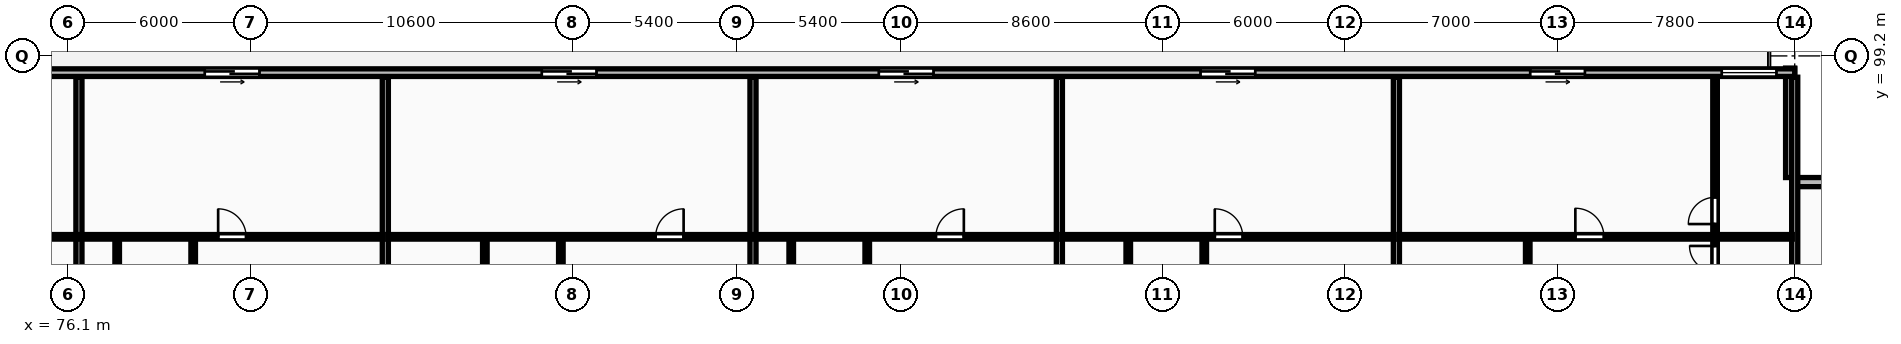
"""IFC4 building model, lengths in metres.
Left out: names, types, materials, properties, quantities, classifications, styles, units other than length and angle.
Written with IfcOpenShell. Run it as: python <this file> out.ifc"""

import sys

from ifc_helpers import new_model, si_unit, direction, frame, frame_2d, origin, place, context, subcontext, project, spatial, rectangle, extrude, element, fill, save


model = new_model("IFC4")
c1 = context("Model", 3, precision=1e-05, world=origin(), true_north=direction((0.0, 1.0)))
c2 = subcontext(c1, "Body", "Model", "MODEL_VIEW")
j1 = project(units=[si_unit("LENGTHUNIT", "METRE"), si_unit("PLANEANGLEUNIT", "RADIAN")], contexts=[c1])
p1 = place(None, origin())
s1 = spatial("IfcSite", under=j1, at=p1, CompositionType="ELEMENT")
p2 = place(p1, origin())
s2 = spatial("IfcBuilding", under=s1, at=p2, CompositionType="ELEMENT")
p3 = place(p2, frame((0.0, 0.0, 24.0)))
s3 = spatial("IfcBuildingStorey", under=s2, at=p3, CompositionType="ELEMENT", Elevation=24.0)
for number, where, z_axis, x_axis in (
    (1, (136.5, 95.05, 0.0), (0.0, 0.0, 1.0), (-1.0, 0.0, 0.0)),
    (2, (132.75, 95.2, 0.0), (0.0, 0.0, 1.0), (0.0, 1.0, 0.0)),
):
    element("IfcWall", number, at=place(p3, frame(where, z_axis=z_axis, x_axis=x_axis)), inside=s3, PredefinedType="STANDARD", context=c2, shape_type="SweptSolid", body=[
        extrude(rectangle(XDim=3.6, YDim=0.3, at=frame_2d((1.8, 0.0))), origin(), (0.0, 0.0, 1.0), 2.97),
    ])
p4 = place(p3, frame((132.9, 98.65, 0.0), z_axis=(0.0, 0.0, 1.0), x_axis=(-1.0, 0.0, 0.0)))
e3 = element("IfcWall", 3, at=p4, inside=s3, PredefinedType="STANDARD", context=c2, shape_type="SweptSolid", body=[
    extrude(rectangle(XDim=77.6, YDim=0.25, at=frame_2d((38.8, 0.0))), origin(), (0.0, 0.0, 1.0), 2.97),
])
p5 = place(p4, frame((71.661, 0.0, 0.0)))
e4 = element("IfcOpeningElement", 4, at=p5, cuts=e3, PredefinedType="OPENING", context=c2, shape_type="SweptSolid", body=[
    extrude(rectangle(XDim=1.8, YDim=2.2, at=frame_2d((0.9, 1.1))), frame((0.0, 0.135, 0.0), z_axis=(0.0, -1.0, 0.0), x_axis=(1.0, 0.0, 0.0)), (0.0, 0.0, 1.0), 0.27),
])
p6 = place(p4, frame((61.079, 0.0, 0.0)))
e5 = element("IfcOpeningElement", 5, at=p6, cuts=e3, PredefinedType="OPENING", context=c2, shape_type="SweptSolid", body=[
    extrude(rectangle(XDim=1.8, YDim=2.2, at=frame_2d((0.9, 1.1))), frame((0.0, 0.135, 0.0), z_axis=(0.0, -1.0, 0.0), x_axis=(1.0, 0.0, 0.0)), (0.0, 0.0, 1.0), 0.27),
])
p7 = place(p4, frame((50.498, 0.0, 0.0)))
e6 = element("IfcOpeningElement", 6, at=p7, cuts=e3, PredefinedType="OPENING", context=c2, shape_type="SweptSolid", body=[
    extrude(rectangle(XDim=1.8, YDim=2.2, at=frame_2d((0.9, 1.1))), frame((0.0, 0.135, 0.0), z_axis=(0.0, -1.0, 0.0), x_axis=(1.0, 0.0, 0.0)), (0.0, 0.0, 1.0), 0.27),
])
p8 = place(p4, frame((39.412, 0.0, 0.0)))
e7 = element("IfcOpeningElement", 7, at=p8, cuts=e3, PredefinedType="OPENING", context=c2, shape_type="SweptSolid", body=[
    extrude(rectangle(XDim=1.8, YDim=2.2, at=frame_2d((0.9, 1.1))), frame((0.0, 0.135, 0.0), z_axis=(0.0, -1.0, 0.0), x_axis=(1.0, 0.0, 0.0)), (0.0, 0.0, 1.0), 0.27),
])
p9 = place(p4, frame((28.326, 0.0, 0.0)))
e8 = element("IfcOpeningElement", 8, at=p9, cuts=e3, PredefinedType="OPENING", context=c2, shape_type="SweptSolid", body=[
    extrude(rectangle(XDim=1.8, YDim=2.2, at=frame_2d((0.9, 1.1))), frame((0.0, 0.135, 0.0), z_axis=(0.0, -1.0, 0.0), x_axis=(1.0, 0.0, 0.0)), (0.0, 0.0, 1.0), 0.27),
])
p10 = place(p4, frame((17.744, 0.0, 0.0)))
e9 = element("IfcOpeningElement", 9, at=p10, cuts=e3, PredefinedType="OPENING", context=c2, shape_type="SweptSolid", body=[
    extrude(rectangle(XDim=1.8, YDim=2.2, at=frame_2d((0.9, 1.1))), frame((0.0, 0.135, 0.0), z_axis=(0.0, -1.0, 0.0), x_axis=(1.0, 0.0, 0.0)), (0.0, 0.0, 1.0), 0.27),
])
p11 = place(p4, frame((6.901, 0.0, 0.0)))
e10 = element("IfcOpeningElement", 10, at=p11, cuts=e3, PredefinedType="OPENING", context=c2, shape_type="SweptSolid", body=[
    extrude(rectangle(XDim=1.8, YDim=2.2, at=frame_2d((0.9, 1.1))), frame((0.0, 0.135, 0.0), z_axis=(0.0, -1.0, 0.0), x_axis=(1.0, 0.0, 0.0)), (0.0, 0.0, 1.0), 0.27),
])
p12 = place(p4, frame((0.6, 0.0, 0.85)))
e11 = element("IfcOpeningElement", 11, at=p12, cuts=e3, PredefinedType="OPENING", context=c2, shape_type="SweptSolid", body=[
    extrude(rectangle(XDim=1.8, YDim=1.8, at=frame_2d((0.9, 0.9))), frame((0.0, 0.135, 0.0), z_axis=(0.0, -1.0, 0.0), x_axis=(1.0, 0.0, 0.0)), (0.0, 0.0, 1.0), 0.27),
])
p13 = place(p3, frame((132.9, 69.43, 0.0), z_axis=(0.0, 0.0, 1.0), x_axis=(0.0, 1.0, 0.0)))
e12 = element("IfcWall", 12, at=p13, inside=s3, PredefinedType="PARTITIONING", context=c2, shape_type="SweptSolid", body=[
    extrude(rectangle(XDim=29.07, YDim=0.2, at=frame_2d((14.535, 0.0))), origin(), (0.0, 0.0, 1.0), 2.97),
])
p14 = place(p3, frame((76.464, 69.43, 0.0), z_axis=(0.0, 0.0, 1.0), x_axis=(0.0, 1.0, 0.0)))
e13 = element("IfcWall", 13, at=p14, inside=s3, PredefinedType="PARTITIONING", context=c2, shape_type="SweptSolid", body=[
    extrude(rectangle(XDim=29.07, YDim=0.2, at=frame_2d((14.535, 0.0))), origin(), (0.0, 0.0, 1.0), 2.22),
])
p15 = place(p3, frame((65.458, 93.25, 0.0), z_axis=(0.0, 0.0, 1.0), x_axis=(1.0, 0.0, 0.0)))
e14 = element("IfcWall", 14, at=p15, inside=s3, PredefinedType="PARTITIONING", context=c2, shape_type="SweptSolid", body=[
    extrude(rectangle(XDim=10.926, YDim=0.15, at=frame_2d((5.463, 0.0))), origin(), (0.0, 0.0, 1.0), 2.97),
])
p16 = place(p15, frame((5.003, 0.0, 0.0)))
e15 = element("IfcOpeningElement", 15, at=p16, cuts=e14, PredefinedType="OPENING", context=c2, shape_type="SweptSolid", body=[
    extrude(rectangle(XDim=0.92, YDim=2.08, at=frame_2d((0.46, 1.04))), frame((0.0, 0.085, 0.0), z_axis=(0.0, -1.0, 0.0), x_axis=(1.0, 0.0, 0.0)), (0.0, 0.0, 1.0), 0.17),
])
p17 = place(p3, frame((86.542, 69.43, 0.0), z_axis=(0.0, 0.0, 1.0), x_axis=(0.0, 1.0, 0.0)))
e16 = element("IfcWall", 16, at=p17, inside=s3, PredefinedType="PARTITIONING", context=c2, shape_type="SweptSolid", body=[
    extrude(rectangle(XDim=29.07, YDim=0.2, at=frame_2d((14.535, 0.0))), origin(), (0.0, 0.0, 1.0), 2.97),
])
p18 = place(p3, frame((77.721, 88.19, 0.0), z_axis=(0.0, 0.0, 1.0), x_axis=(0.0, 1.0, 0.0)))
e17 = element("IfcWall", 17, at=p18, inside=s3, PredefinedType="PARTITIONING", context=c2, shape_type="SweptSolid", body=[
    extrude(rectangle(XDim=5.0, YDim=0.15, at=frame_2d((2.5, 0.0))), origin(), (0.0, 0.0, 1.0), 2.97),
])
p19 = place(p18, frame((0.419, 0.0, 0.0)))
e18 = element("IfcOpeningElement", 18, at=p19, cuts=e17, PredefinedType="OPENING", context=c2, shape_type="SweptSolid", body=[
    extrude(rectangle(XDim=0.84, YDim=2.04, at=frame_2d((0.42, 1.02))), frame((0.0, 0.085, 0.0), z_axis=(0.0, -1.0, 0.0), x_axis=(1.0, 0.0, 0.0)), (0.0, 0.0, 1.0), 0.17),
])
p20 = place(p3, frame((80.221, 88.19, 0.0), z_axis=(0.0, 0.0, 1.0), x_axis=(0.0, 1.0, 0.0)))
e19 = element("IfcWall", 19, at=p20, inside=s3, PredefinedType="PARTITIONING", context=c2, shape_type="SweptSolid", body=[
    extrude(rectangle(XDim=5.0, YDim=0.15, at=frame_2d((2.5, 0.0))), origin(), (0.0, 0.0, 1.0), 2.97),
])
p21 = place(p20, frame((2.08, 0.0, 0.0)))
e20 = element("IfcOpeningElement", 20, at=p21, cuts=e19, PredefinedType="OPENING", context=c2, shape_type="SweptSolid", body=[
    extrude(rectangle(XDim=0.84, YDim=2.04, at=frame_2d((0.42, 1.02))), frame((0.0, 0.085, 0.0), z_axis=(0.0, -1.0, 0.0), x_axis=(1.0, 0.0, 0.0)), (0.0, 0.0, 1.0), 0.17),
])
p22 = place(p3, frame((76.544, 93.25, 0.0), z_axis=(0.0, 0.0, 1.0), x_axis=(1.0, 0.0, 0.0)))
e21 = element("IfcWall", 21, at=p22, inside=s3, PredefinedType="PARTITIONING", context=c2, shape_type="SweptSolid", body=[
    extrude(rectangle(XDim=9.918, YDim=0.15, at=frame_2d((4.959, 0.0))), origin(), (0.0, 0.0, 1.0), 2.97),
])
p23 = place(p22, frame((4.499, 0.0, 0.0)))
e22 = element("IfcOpeningElement", 22, at=p23, cuts=e21, PredefinedType="OPENING", context=c2, shape_type="SweptSolid", body=[
    extrude(rectangle(XDim=0.92, YDim=2.08, at=frame_2d((0.46, 1.04))), frame((0.0, 0.085, 0.0), z_axis=(0.0, -1.0, 0.0), x_axis=(1.0, 0.0, 0.0)), (0.0, 0.0, 1.0), 0.17),
])
p24 = place(p3, frame((98.635, 69.43, 0.0), z_axis=(0.0, 0.0, 1.0), x_axis=(0.0, 1.0, 0.0)))
e23 = element("IfcWall", 23, at=p24, inside=s3, PredefinedType="PARTITIONING", context=c2, shape_type="SweptSolid", body=[
    extrude(rectangle(XDim=29.07, YDim=0.2, at=frame_2d((14.535, 0.0))), origin(), (0.0, 0.0, 1.0), 2.97),
])
p25 = place(p3, frame((89.815, 88.19, 0.0), z_axis=(0.0, 0.0, 1.0), x_axis=(0.0, 1.0, 0.0)))
e24 = element("IfcWall", 24, at=p25, inside=s3, PredefinedType="PARTITIONING", context=c2, shape_type="SweptSolid", body=[
    extrude(rectangle(XDim=5.0, YDim=0.15, at=frame_2d((2.5, 0.0))), origin(), (0.0, 0.0, 1.0), 2.97),
])
p26 = place(p25, frame((2.08, 0.0, 0.0)))
e25 = element("IfcOpeningElement", 25, at=p26, cuts=e24, PredefinedType="OPENING", context=c2, shape_type="SweptSolid", body=[
    extrude(rectangle(XDim=0.84, YDim=2.04, at=frame_2d((0.42, 1.02))), frame((0.0, 0.085, 0.0), z_axis=(0.0, -1.0, 0.0), x_axis=(1.0, 0.0, 0.0)), (0.0, 0.0, 1.0), 0.17),
])
p27 = place(p3, frame((92.315, 88.19, 0.0), z_axis=(0.0, 0.0, 1.0), x_axis=(0.0, 1.0, 0.0)))
e26 = element("IfcWall", 26, at=p27, inside=s3, PredefinedType="PARTITIONING", context=c2, shape_type="SweptSolid", body=[
    extrude(rectangle(XDim=5.0, YDim=0.15, at=frame_2d((2.5, 0.0))), origin(), (0.0, 0.0, 1.0), 2.97),
])
p28 = place(p27, frame((0.4, 0.0, 0.0)))
e27 = element("IfcOpeningElement", 27, at=p28, cuts=e26, PredefinedType="OPENING", context=c2, shape_type="SweptSolid", body=[
    extrude(rectangle(XDim=0.84, YDim=2.04, at=frame_2d((0.42, 1.02))), frame((0.0, 0.085, 0.0), z_axis=(0.0, -1.0, 0.0), x_axis=(1.0, 0.0, 0.0)), (0.0, 0.0, 1.0), 0.17),
])
p29 = place(p3, frame((86.622, 93.25, 0.0), z_axis=(0.0, 0.0, 1.0), x_axis=(1.0, 0.0, 0.0)))
e28 = element("IfcWall", 28, at=p29, inside=s3, PredefinedType="PARTITIONING", context=c2, shape_type="SweptSolid", body=[
    extrude(rectangle(XDim=11.933, YDim=0.15, at=frame_2d((5.967, 0.0))), origin(), (0.0, 0.0, 1.0), 2.97),
])
p30 = place(p29, frame((8.812, 0.0, 0.0)))
e29 = element("IfcOpeningElement", 29, at=p30, cuts=e28, PredefinedType="OPENING", context=c2, shape_type="SweptSolid", body=[
    extrude(rectangle(XDim=0.92, YDim=2.08, at=frame_2d((0.46, 1.04))), frame((0.0, 0.085, 0.0), z_axis=(0.0, -1.0, 0.0), x_axis=(1.0, 0.0, 0.0)), (0.0, 0.0, 1.0), 0.17),
])
p31 = place(p3, frame((108.713, 69.43, 0.0), z_axis=(0.0, 0.0, 1.0), x_axis=(0.0, 1.0, 0.0)))
e30 = element("IfcWall", 30, at=p31, inside=s3, PredefinedType="PARTITIONING", context=c2, shape_type="SweptSolid", body=[
    extrude(rectangle(XDim=29.07, YDim=0.2, at=frame_2d((14.535, 0.0))), origin(), (0.0, 0.0, 1.0), 2.97),
])
p32 = place(p3, frame((99.893, 88.19, 0.0), z_axis=(0.0, 0.0, 1.0), x_axis=(0.0, 1.0, 0.0)))
e31 = element("IfcWall", 31, at=p32, inside=s3, PredefinedType="PARTITIONING", context=c2, shape_type="SweptSolid", body=[
    extrude(rectangle(XDim=5.0, YDim=0.15, at=frame_2d((2.5, 0.0))), origin(), (0.0, 0.0, 1.0), 2.97),
])
p33 = place(p32, frame((2.08, 0.0, 0.0)))
e32 = element("IfcOpeningElement", 32, at=p33, cuts=e31, PredefinedType="OPENING", context=c2, shape_type="SweptSolid", body=[
    extrude(rectangle(XDim=0.84, YDim=2.04, at=frame_2d((0.42, 1.02))), frame((0.0, 0.085, 0.0), z_axis=(0.0, -1.0, 0.0), x_axis=(1.0, 0.0, 0.0)), (0.0, 0.0, 1.0), 0.17),
])
p34 = place(p3, frame((102.393, 88.19, 0.0), z_axis=(0.0, 0.0, 1.0), x_axis=(0.0, 1.0, 0.0)))
e33 = element("IfcWall", 33, at=p34, inside=s3, PredefinedType="PARTITIONING", context=c2, shape_type="SweptSolid", body=[
    extrude(rectangle(XDim=5.0, YDim=0.15, at=frame_2d((2.5, 0.0))), origin(), (0.0, 0.0, 1.0), 2.97),
])
p35 = place(p34, frame((0.4, 0.0, 0.0)))
e34 = element("IfcOpeningElement", 34, at=p35, cuts=e33, PredefinedType="OPENING", context=c2, shape_type="SweptSolid", body=[
    extrude(rectangle(XDim=0.84, YDim=2.04, at=frame_2d((0.42, 1.02))), frame((0.0, 0.085, 0.0), z_axis=(0.0, -1.0, 0.0), x_axis=(1.0, 0.0, 0.0)), (0.0, 0.0, 1.0), 0.17),
])
p36 = place(p3, frame((98.715, 93.25, 0.0), z_axis=(0.0, 0.0, 1.0), x_axis=(1.0, 0.0, 0.0)))
e35 = element("IfcWall", 35, at=p36, inside=s3, PredefinedType="PARTITIONING", context=c2, shape_type="SweptSolid", body=[
    extrude(rectangle(XDim=9.918, YDim=0.15, at=frame_2d((4.959, 0.0))), origin(), (0.0, 0.0, 1.0), 2.97),
])
p37 = place(p36, frame((5.936, 0.0, 0.0)))
e36 = element("IfcOpeningElement", 36, at=p37, cuts=e35, PredefinedType="OPENING", context=c2, shape_type="SweptSolid", body=[
    extrude(rectangle(XDim=0.92, YDim=2.08, at=frame_2d((0.46, 1.04))), frame((0.0, 0.085, 0.0), z_axis=(0.0, -1.0, 0.0), x_axis=(1.0, 0.0, 0.0)), (0.0, 0.0, 1.0), 0.17),
])
p38 = place(p3, frame((119.799, 69.43, 0.0), z_axis=(0.0, 0.0, 1.0), x_axis=(0.0, 1.0, 0.0)))
e37 = element("IfcWall", 37, at=p38, inside=s3, PredefinedType="PARTITIONING", context=c2, shape_type="SweptSolid", body=[
    extrude(rectangle(XDim=29.07, YDim=0.2, at=frame_2d((14.535, 0.0))), origin(), (0.0, 0.0, 1.0), 2.97),
])
p39 = place(p3, frame((110.979, 88.19, 0.0), z_axis=(0.0, 0.0, 1.0), x_axis=(0.0, 1.0, 0.0)))
e38 = element("IfcWall", 38, at=p39, inside=s3, PredefinedType="PARTITIONING", context=c2, shape_type="SweptSolid", body=[
    extrude(rectangle(XDim=5.0, YDim=0.15, at=frame_2d((2.5, 0.0))), origin(), (0.0, 0.0, 1.0), 2.97),
])
p40 = place(p39, frame((0.419, 0.0, 0.0)))
e39 = element("IfcOpeningElement", 39, at=p40, cuts=e38, PredefinedType="OPENING", context=c2, shape_type="SweptSolid", body=[
    extrude(rectangle(XDim=0.84, YDim=2.04, at=frame_2d((0.42, 1.02))), frame((0.0, 0.085, 0.0), z_axis=(0.0, -1.0, 0.0), x_axis=(1.0, 0.0, 0.0)), (0.0, 0.0, 1.0), 0.17),
])
p41 = place(p3, frame((113.479, 88.19, 0.0), z_axis=(0.0, 0.0, 1.0), x_axis=(0.0, 1.0, 0.0)))
e40 = element("IfcWall", 40, at=p41, inside=s3, PredefinedType="PARTITIONING", context=c2, shape_type="SweptSolid", body=[
    extrude(rectangle(XDim=5.0, YDim=0.15, at=frame_2d((2.5, 0.0))), origin(), (0.0, 0.0, 1.0), 2.97),
])
p42 = place(p41, frame((0.4, 0.0, 0.0)))
e41 = element("IfcOpeningElement", 41, at=p42, cuts=e40, PredefinedType="OPENING", context=c2, shape_type="SweptSolid", body=[
    extrude(rectangle(XDim=0.84, YDim=2.04, at=frame_2d((0.42, 1.02))), frame((0.0, 0.085, 0.0), z_axis=(0.0, -1.0, 0.0), x_axis=(1.0, 0.0, 0.0)), (0.0, 0.0, 1.0), 0.17),
])
p43 = place(p3, frame((108.793, 93.25, 0.0), z_axis=(0.0, 0.0, 1.0), x_axis=(1.0, 0.0, 0.0)))
e42 = element("IfcWall", 42, at=p43, inside=s3, PredefinedType="PARTITIONING", context=c2, shape_type="SweptSolid", body=[
    extrude(rectangle(XDim=10.926, YDim=0.15, at=frame_2d((5.463, 0.0))), origin(), (0.0, 0.0, 1.0), 2.97),
])
p44 = place(p43, frame((5.031, 0.0, 0.0)))
e43 = element("IfcOpeningElement", 43, at=p44, cuts=e42, PredefinedType="OPENING", context=c2, shape_type="SweptSolid", body=[
    extrude(rectangle(XDim=0.92, YDim=2.08, at=frame_2d((0.46, 1.04))), frame((0.0, 0.085, 0.0), z_axis=(0.0, -1.0, 0.0), x_axis=(1.0, 0.0, 0.0)), (0.0, 0.0, 1.0), 0.17),
])
p45 = place(p3, frame((124.119, 88.19, 0.0), z_axis=(0.0, 0.0, 1.0), x_axis=(0.0, 1.0, 0.0)))
e44 = element("IfcWall", 44, at=p45, inside=s3, PredefinedType="PARTITIONING", context=c2, shape_type="SweptSolid", body=[
    extrude(rectangle(XDim=5.0, YDim=0.15, at=frame_2d((2.5, 0.0))), origin(), (0.0, 0.0, 1.0), 2.97),
])
p46 = place(p45, frame((2.06, 0.0, 0.0)))
e45 = element("IfcOpeningElement", 45, at=p46, cuts=e44, PredefinedType="OPENING", context=c2, shape_type="SweptSolid", body=[
    extrude(rectangle(XDim=0.88, YDim=2.06, at=frame_2d((0.44, 1.03))), frame((0.0, 0.085, 0.0), z_axis=(0.0, -1.0, 0.0), x_axis=(1.0, 0.0, 0.0)), (0.0, 0.0, 1.0), 0.17),
])
p47 = place(p3, frame((130.28, 88.19, 0.0), z_axis=(0.0, 0.0, 1.0), x_axis=(0.0, 1.0, 0.0)))
e46 = element("IfcWall", 46, at=p47, inside=s3, PredefinedType="PARTITIONING", context=c2, shape_type="SweptSolid", body=[
    extrude(rectangle(XDim=10.31, YDim=0.15, at=frame_2d((5.155, 0.0))), origin(), (0.0, 0.0, 1.0), 2.97),
])
p48 = place(p47, frame((0.513, 0.0, 0.0)))
e47 = element("IfcOpeningElement", 47, at=p48, cuts=e46, PredefinedType="OPENING", context=c2, shape_type="SweptSolid", body=[
    extrude(rectangle(XDim=0.84, YDim=2.04, at=frame_2d((0.42, 1.02))), frame((0.0, 0.085, 0.0), z_axis=(0.0, -1.0, 0.0), x_axis=(1.0, 0.0, 0.0)), (0.0, 0.0, 1.0), 0.17),
])
p49 = place(p47, frame((3.92, 0.0, 0.0)))
e48 = element("IfcOpeningElement", 48, at=p49, cuts=e46, PredefinedType="OPENING", context=c2, shape_type="SweptSolid", body=[
    extrude(rectangle(XDim=0.84, YDim=2.04, at=frame_2d((0.42, 1.02))), frame((0.0, 0.085, 0.0), z_axis=(0.0, -1.0, 0.0), x_axis=(1.0, 0.0, 0.0)), (0.0, 0.0, 1.0), 0.17),
])
p50 = place(p47, frame((5.48, 0.0, 0.0)))
e49 = element("IfcOpeningElement", 49, at=p50, cuts=e46, PredefinedType="OPENING", context=c2, shape_type="SweptSolid", body=[
    extrude(rectangle(XDim=0.88, YDim=2.06, at=frame_2d((0.44, 1.03))), frame((0.0, 0.085, 0.0), z_axis=(0.0, -1.0, 0.0), x_axis=(1.0, 0.0, 0.0)), (0.0, 0.0, 1.0), 0.17),
])
p51 = place(p3, frame((119.879, 93.25, 0.0), z_axis=(0.0, 0.0, 1.0), x_axis=(1.0, 0.0, 0.0)))
e50 = element("IfcWall", 50, at=p51, inside=s3, PredefinedType="PARTITIONING", context=c2, shape_type="SweptSolid", body=[
    extrude(rectangle(XDim=12.941, YDim=0.15, at=frame_2d((6.471, 0.0))), origin(), (0.0, 0.0, 1.0), 2.97),
])
p52 = place(p51, frame((5.806, 0.0, 0.0)))
e51 = element("IfcOpeningElement", 51, at=p52, cuts=e50, PredefinedType="OPENING", context=c2, shape_type="SweptSolid", body=[
    extrude(rectangle(XDim=0.94, YDim=2.1, at=frame_2d((0.47, 1.05))), frame((0.0, 0.085, 0.0), z_axis=(0.0, -1.0, 0.0), x_axis=(1.0, 0.0, 0.0)), (0.0, 0.0, 1.0), 0.17),
])
p53 = place(p7, origin())
e52 = element("IfcDoor", 52, at=p53, inside=s3, OperationType="SLIDING_TO_LEFT", PredefinedType="DOOR", context=c2, shape_type="SweptSolid", body=[
    extrude(rectangle(XDim=1.8, YDim=2.2, at=frame_2d((0.9, 1.1))), frame((0.0, 0.025, 0.0), z_axis=(0.0, -1.0, 0.0), x_axis=(1.0, 0.0, 0.0)), (0.0, 0.0, 1.0), 0.05),
])
fill(e6, e52)
p54 = place(p8, origin())
e53 = element("IfcDoor", 53, at=p54, inside=s3, OperationType="SLIDING_TO_LEFT", PredefinedType="DOOR", context=c2, shape_type="SweptSolid", body=[
    extrude(rectangle(XDim=1.8, YDim=2.2, at=frame_2d((0.9, 1.1))), frame((0.0, 0.025, 0.0), z_axis=(0.0, -1.0, 0.0), x_axis=(1.0, 0.0, 0.0)), (0.0, 0.0, 1.0), 0.05),
])
fill(e7, e53)
p55 = place(p9, origin())
e54 = element("IfcDoor", 54, at=p55, inside=s3, OperationType="SLIDING_TO_LEFT", PredefinedType="DOOR", context=c2, shape_type="SweptSolid", body=[
    extrude(rectangle(XDim=1.8, YDim=2.2, at=frame_2d((0.9, 1.1))), frame((0.0, 0.025, 0.0), z_axis=(0.0, -1.0, 0.0), x_axis=(1.0, 0.0, 0.0)), (0.0, 0.0, 1.0), 0.05),
])
fill(e8, e54)
p56 = place(p10, origin())
e55 = element("IfcDoor", 55, at=p56, inside=s3, OperationType="SLIDING_TO_LEFT", PredefinedType="DOOR", context=c2, shape_type="SweptSolid", body=[
    extrude(rectangle(XDim=1.8, YDim=2.2, at=frame_2d((0.9, 1.1))), frame((0.0, 0.025, 0.0), z_axis=(0.0, -1.0, 0.0), x_axis=(1.0, 0.0, 0.0)), (0.0, 0.0, 1.0), 0.05),
])
fill(e9, e55)
p57 = place(p11, origin())
e56 = element("IfcDoor", 56, at=p57, inside=s3, OperationType="SLIDING_TO_LEFT", PredefinedType="DOOR", context=c2, shape_type="SweptSolid", body=[
    extrude(rectangle(XDim=1.8, YDim=2.2, at=frame_2d((0.9, 1.1))), frame((0.0, 0.025, 0.0), z_axis=(0.0, -1.0, 0.0), x_axis=(1.0, 0.0, 0.0)), (0.0, 0.0, 1.0), 0.05),
])
fill(e10, e56)
p58 = place(p12, origin())
e57 = element("IfcWindow", 57, at=p58, inside=s3, PartitioningType="SINGLE_PANEL", PredefinedType="WINDOW", context=c2, shape_type="SweptSolid", body=[
    extrude(rectangle(XDim=1.8, YDim=1.8, at=frame_2d((0.9, 0.9))), frame((0.0, 0.03, 0.0), z_axis=(0.0, -1.0, 0.0), x_axis=(1.0, 0.0, 0.0)), (0.0, 0.0, 1.0), 0.06),
])
fill(e11, e57)
p59 = place(p23, origin())
e58 = element("IfcDoor", 58, at=p59, inside=s3, OperationType="SINGLE_SWING_LEFT", PredefinedType="DOOR", context=c2, shape_type="SweptSolid", body=[
    extrude(rectangle(XDim=0.92, YDim=2.08, at=frame_2d((0.46, 1.04))), frame((0.0, 0.025, 0.0), z_axis=(0.0, -1.0, 0.0), x_axis=(1.0, 0.0, 0.0)), (0.0, 0.0, 1.0), 0.05),
])
fill(e22, e58)
p60 = place(p30, origin())
e59 = element("IfcDoor", 59, at=p60, inside=s3, OperationType="SINGLE_SWING_RIGHT", PredefinedType="DOOR", context=c2, shape_type="SweptSolid", body=[
    extrude(rectangle(XDim=0.92, YDim=2.08, at=frame_2d((0.46, 1.04))), frame((0.0, 0.025, 0.0), z_axis=(0.0, -1.0, 0.0), x_axis=(1.0, 0.0, 0.0)), (0.0, 0.0, 1.0), 0.05),
])
fill(e29, e59)
p61 = place(p37, origin())
e60 = element("IfcDoor", 60, at=p61, inside=s3, OperationType="SINGLE_SWING_RIGHT", PredefinedType="DOOR", context=c2, shape_type="SweptSolid", body=[
    extrude(rectangle(XDim=0.92, YDim=2.08, at=frame_2d((0.46, 1.04))), frame((0.0, 0.025, 0.0), z_axis=(0.0, -1.0, 0.0), x_axis=(1.0, 0.0, 0.0)), (0.0, 0.0, 1.0), 0.05),
])
fill(e36, e60)
p62 = place(p44, origin())
e61 = element("IfcDoor", 61, at=p62, inside=s3, OperationType="SINGLE_SWING_LEFT", PredefinedType="DOOR", context=c2, shape_type="SweptSolid", body=[
    extrude(rectangle(XDim=0.92, YDim=2.08, at=frame_2d((0.46, 1.04))), frame((0.0, 0.025, 0.0), z_axis=(0.0, -1.0, 0.0), x_axis=(1.0, 0.0, 0.0)), (0.0, 0.0, 1.0), 0.05),
])
fill(e43, e61)
p63 = place(p49, origin())
e62 = element("IfcDoor", 62, at=p63, inside=s3, OperationType="SINGLE_SWING_RIGHT", PredefinedType="DOOR", context=c2, shape_type="SweptSolid", body=[
    extrude(rectangle(XDim=0.84, YDim=2.04, at=frame_2d((0.42, 1.02))), frame((0.0, 0.025, 0.0), z_axis=(0.0, -1.0, 0.0), x_axis=(1.0, 0.0, 0.0)), (0.0, 0.0, 1.0), 0.05),
])
fill(e48, e62)
p64 = place(p50, origin())
e63 = element("IfcDoor", 63, at=p64, inside=s3, OperationType="SINGLE_SWING_LEFT", PredefinedType="DOOR", context=c2, shape_type="SweptSolid", body=[
    extrude(rectangle(XDim=0.88, YDim=2.06, at=frame_2d((0.44, 1.03))), frame((0.0, 0.025, 0.0), z_axis=(0.0, -1.0, 0.0), x_axis=(1.0, 0.0, 0.0)), (0.0, 0.0, 1.0), 0.05),
])
fill(e49, e63)
p65 = place(p52, origin())
e64 = element("IfcDoor", 64, at=p65, inside=s3, OperationType="SINGLE_SWING_LEFT", PredefinedType="DOOR", context=c2, shape_type="SweptSolid", body=[
    extrude(rectangle(XDim=0.94, YDim=2.1, at=frame_2d((0.47, 1.05))), frame((0.0, 0.025, 0.0), z_axis=(0.0, -1.0, 0.0), x_axis=(1.0, 0.0, 0.0)), (0.0, 0.0, 1.0), 0.05),
])
fill(e51, e64)
save(model, sys.argv[1])
